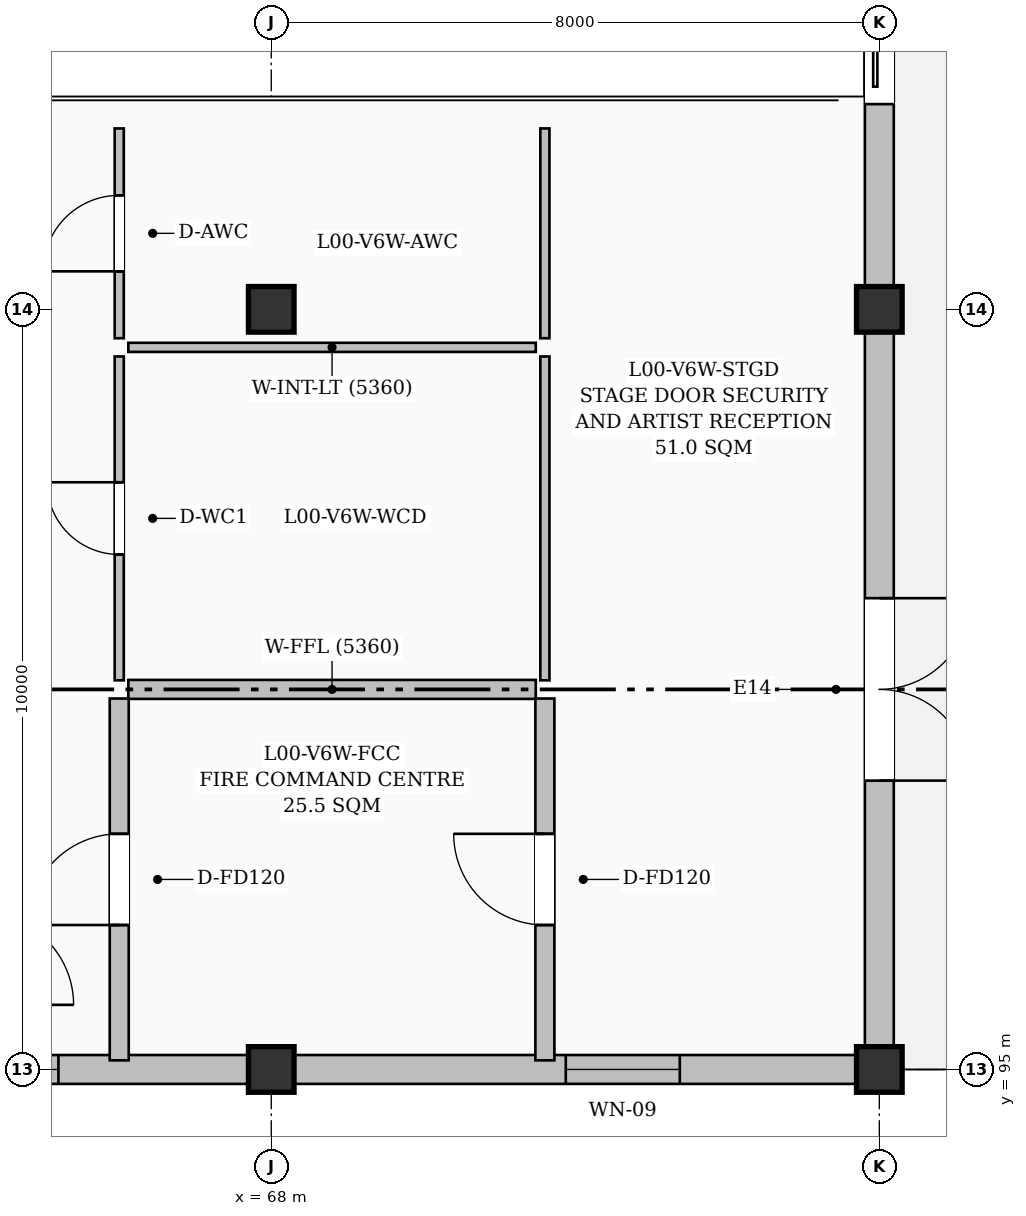
"""IFC4 building model, lengths in metres.
Left out: names, types, materials, properties, quantities, classifications, styles, units other than length and angle.
Written with IfcOpenShell. Run it as: python <this file> out.ifc"""

import sys

from ifc_helpers import new_model, si_unit, direction, frame, frame_2d, origin, origin_2d, place, context, subcontext, project, spatial, rectangle, extrude, element, fill, save


model = new_model("IFC4")
c1 = context("Model", 3, precision=1e-05, world=origin(), true_north=direction((0.0, 1.0)))
c2 = subcontext(c1, "Body", "Model", "MODEL_VIEW")
j1 = project(units=[si_unit("LENGTHUNIT", "METRE"), si_unit("PLANEANGLEUNIT", "RADIAN")], contexts=[c1])
p1 = place(None, origin())
s1 = spatial("IfcSite", under=j1, at=p1, CompositionType="ELEMENT")
p2 = place(p1, origin())
s2 = spatial("IfcBuilding", under=s1, at=p2, CompositionType="ELEMENT")
p3 = place(p2, origin())
s3 = spatial("IfcBuildingStorey", under=s2, at=p3, CompositionType="ELEMENT", Elevation=0.0)
for number, where, z_axis, x_axis in (
    (1, (68.0, 95.0, 0.0), (0.0, 0.0, 1.0), (1.0, 0.0, 0.0)),
    (2, (68.0, 105.0, 0.0), (0.0, 0.0, 1.0), (1.0, 0.0, 0.0)),
    (3, (76.0, 95.0, 0.0), (0.0, 0.0, 1.0), (1.0, 0.0, 0.0)),
    (4, (76.0, 105.0, 0.0), (0.0, 0.0, 1.0), (1.0, 0.0, 0.0)),
):
    element("IfcColumn", number, at=place(p3, frame(where, z_axis=z_axis, x_axis=x_axis)), inside=s3, PredefinedType="COLUMN", context=c2, shape_type="SweptSolid", body=[
        extrude(rectangle(XDim=0.6, YDim=0.6, at=origin_2d()), origin(), (0.0, 0.0, 1.0), 4.8),
    ])
p4 = place(p3, frame((76.0, 114.7, 0.0), z_axis=(0.0, 0.0, 1.0), x_axis=(0.0, -1.0, 0.0)))
e5 = element("IfcWall", 5, at=p4, inside=s3, PredefinedType="SOLIDWALL", context=c2, shape_type="SweptSolid", body=[
    extrude(rectangle(XDim=9.4, YDim=0.38, at=frame_2d((4.7, 0.0))), origin(), (0.0, 0.0, 1.0), 4.55),
])
p5 = place(p4, frame((2.4, 0.0, 0.0)))
e6 = element("IfcOpeningElement", 6, at=p5, cuts=e5, PredefinedType="OPENING", context=c2, shape_type="SweptSolid", body=[
    extrude(rectangle(XDim=4.6, YDim=3.0, at=frame_2d((2.3, 1.5))), frame((0.0, 0.2, 0.0), z_axis=(0.0, -1.0, 0.0), x_axis=(1.0, 0.0, 0.0)), (0.0, 0.0, 1.0), 0.4),
])
p6 = place(p3, frame((76.0, 104.7, 0.0), z_axis=(0.0, 0.0, 1.0), x_axis=(0.0, -1.0, 0.0)))
e7 = element("IfcWall", 7, at=p6, inside=s3, PredefinedType="SOLIDWALL", context=c2, shape_type="SweptSolid", body=[
    extrude(rectangle(XDim=9.4, YDim=0.38, at=frame_2d((4.7, 0.0))), origin(), (0.0, 0.0, 1.0), 4.55),
])
p7 = place(p6, frame((3.5, 0.0, 0.0)))
e8 = element("IfcOpeningElement", 8, at=p7, cuts=e7, PredefinedType="OPENING", context=c2, shape_type="SweptSolid", body=[
    extrude(rectangle(XDim=2.4, YDim=2.4, at=frame_2d((1.2, 1.2))), frame((0.0, 0.2, 0.0), z_axis=(0.0, -1.0, 0.0), x_axis=(1.0, 0.0, 0.0)), (0.0, 0.0, 1.0), 0.4),
])
p8 = place(p3, frame((75.7, 95.0, 0.0), z_axis=(0.0, 0.0, 1.0), x_axis=(-1.0, 0.0, 0.0)))
e9 = element("IfcWall", 9, at=p8, inside=s3, PredefinedType="SOLIDWALL", context=c2, shape_type="SweptSolid", body=[
    extrude(rectangle(XDim=7.4, YDim=0.38, at=frame_2d((3.7, 0.0))), origin(), (0.0, 0.0, 1.0), 4.55),
])
p9 = place(p8, frame((2.325, 0.0, 0.95)))
e10 = element("IfcOpeningElement", 10, at=p9, cuts=e9, PredefinedType="OPENING", context=c2, shape_type="SweptSolid", body=[
    extrude(rectangle(XDim=1.5, YDim=1.5, at=frame_2d((0.75, 0.75))), frame((0.0, 0.2, 0.0), z_axis=(0.0, -1.0, 0.0), x_axis=(1.0, 0.0, 0.0)), (0.0, 0.0, 1.0), 0.4),
])
p10 = place(p3, frame((67.7, 95.0, 0.0), z_axis=(0.0, 0.0, 1.0), x_axis=(-1.0, 0.0, 0.0)))
e11 = element("IfcWall", 11, at=p10, inside=s3, PredefinedType="SOLIDWALL", context=c2, shape_type="SweptSolid", body=[
    extrude(rectangle(XDim=7.4, YDim=0.38, at=frame_2d((3.7, 0.0))), origin(), (0.0, 0.0, 1.0), 4.235),
])
p11 = place(p10, frame((2.5, 0.0, 0.95)))
e12 = element("IfcOpeningElement", 12, at=p11, cuts=e11, PredefinedType="OPENING", context=c2, shape_type="SweptSolid", body=[
    extrude(rectangle(XDim=2.4, YDim=1.5, at=frame_2d((1.2, 0.75))), frame((0.0, 0.2, 0.0), z_axis=(0.0, -1.0, 0.0), x_axis=(1.0, 0.0, 0.0)), (0.0, 0.0, 1.0), 0.4),
])
p12 = place(p3, frame((66.0, 95.12, 0.0), z_axis=(0.0, 0.0, 1.0), x_axis=(0.0, 1.0, 0.0)))
e13 = element("IfcWall", 13, at=p12, inside=s3, PredefinedType="SOLIDWALL", context=c2, shape_type="SweptSolid", body=[
    extrude(rectangle(XDim=4.76, YDim=0.25, at=frame_2d((2.38, 0.0))), origin(), (0.0, 0.0, 1.0), 4.55),
])
p13 = place(p12, frame((1.78, 0.0, 0.0)))
e14 = element("IfcOpeningElement", 14, at=p13, cuts=e13, PredefinedType="OPENING", context=c2, shape_type="SweptSolid", body=[
    extrude(rectangle(XDim=1.2, YDim=2.2, at=frame_2d((0.6, 1.1))), frame((0.0, 0.135, 0.0), z_axis=(0.0, -1.0, 0.0), x_axis=(1.0, 0.0, 0.0)), (0.0, 0.0, 1.0), 0.27),
])
p14 = place(p3, frame((66.0, 100.12, 0.0), z_axis=(0.0, 0.0, 1.0), x_axis=(0.0, 1.0, 0.0)))
e15 = element("IfcWall", 15, at=p14, inside=s3, PredefinedType="PARTITIONING", context=c2, shape_type="SweptSolid", body=[
    extrude(rectangle(XDim=4.26, YDim=0.12, at=frame_2d((2.13, 0.0))), origin(), (0.0, 0.0, 1.0), 4.55),
])
p15 = place(p14, frame((1.655, 0.0, 0.0)))
e16 = element("IfcOpeningElement", 16, at=p15, cuts=e15, PredefinedType="OPENING", context=c2, shape_type="SweptSolid", body=[
    extrude(rectangle(XDim=0.95, YDim=2.1, at=frame_2d((0.475, 1.05))), frame((0.0, 0.07, 0.0), z_axis=(0.0, -1.0, 0.0), x_axis=(1.0, 0.0, 0.0)), (0.0, 0.0, 1.0), 0.14),
])
p16 = place(p3, frame((66.0, 104.62, 0.0), z_axis=(0.0, 0.0, 1.0), x_axis=(0.0, 1.0, 0.0)))
e17 = element("IfcWall", 17, at=p16, inside=s3, PredefinedType="PARTITIONING", context=c2, shape_type="SweptSolid", body=[
    extrude(rectangle(XDim=2.76, YDim=0.12, at=frame_2d((1.38, 0.0))), origin(), (0.0, 0.0, 1.0), 4.55),
])
p17 = place(p16, frame((0.88, 0.0, 0.0)))
e18 = element("IfcOpeningElement", 18, at=p17, cuts=e17, PredefinedType="OPENING", context=c2, shape_type="SweptSolid", body=[
    extrude(rectangle(XDim=1.0, YDim=2.1, at=frame_2d((0.5, 1.05))), frame((0.0, 0.07, 0.0), z_axis=(0.0, -1.0, 0.0), x_axis=(1.0, 0.0, 0.0)), (0.0, 0.0, 1.0), 0.14),
])
p18 = place(p3, frame((71.6, 95.12, 0.0), z_axis=(0.0, 0.0, 1.0), x_axis=(0.0, 1.0, 0.0)))
e19 = element("IfcWall", 19, at=p18, inside=s3, PredefinedType="SOLIDWALL", context=c2, shape_type="SweptSolid", body=[
    extrude(rectangle(XDim=4.76, YDim=0.25, at=frame_2d((2.38, 0.0))), origin(), (0.0, 0.0, 1.0), 4.55),
])
p19 = place(p18, frame((1.78, 0.0, 0.0)))
e20 = element("IfcOpeningElement", 20, at=p19, cuts=e19, PredefinedType="OPENING", context=c2, shape_type="SweptSolid", body=[
    extrude(rectangle(XDim=1.2, YDim=2.2, at=frame_2d((0.6, 1.1))), frame((0.0, 0.135, 0.0), z_axis=(0.0, -1.0, 0.0), x_axis=(1.0, 0.0, 0.0)), (0.0, 0.0, 1.0), 0.27),
])
p20 = place(p3, frame((66.12, 100.0, 0.0), z_axis=(0.0, 0.0, 1.0), x_axis=(1.0, 0.0, 0.0)))
e21 = element("IfcWall", 21, at=p20, inside=s3, PredefinedType="SOLIDWALL", context=c2, shape_type="SweptSolid", body=[
    extrude(rectangle(XDim=5.36, YDim=0.25, at=frame_2d((2.68, 0.0))), origin(), (0.0, 0.0, 1.0), 4.55),
])
p21 = place(p3, frame((71.6, 100.12, 0.0), z_axis=(0.0, 0.0, 1.0), x_axis=(0.0, 1.0, 0.0)))
e22 = element("IfcWall", 22, at=p21, inside=s3, PredefinedType="PARTITIONING", context=c2, shape_type="SweptSolid", body=[
    extrude(rectangle(XDim=4.26, YDim=0.12, at=frame_2d((2.13, 0.0))), origin(), (0.0, 0.0, 1.0), 4.55),
])
p22 = place(p3, frame((71.6, 104.62, 0.0), z_axis=(0.0, 0.0, 1.0), x_axis=(0.0, 1.0, 0.0)))
e23 = element("IfcWall", 23, at=p22, inside=s3, PredefinedType="PARTITIONING", context=c2, shape_type="SweptSolid", body=[
    extrude(rectangle(XDim=2.76, YDim=0.12, at=frame_2d((1.38, 0.0))), origin(), (0.0, 0.0, 1.0), 4.55),
])
p23 = place(p3, frame((66.12, 104.5, 0.0), z_axis=(0.0, 0.0, 1.0), x_axis=(1.0, 0.0, 0.0)))
e24 = element("IfcWall", 24, at=p23, inside=s3, PredefinedType="PARTITIONING", context=c2, shape_type="SweptSolid", body=[
    extrude(rectangle(XDim=5.36, YDim=0.12, at=frame_2d((2.68, 0.0))), origin(), (0.0, 0.0, 1.0), 4.55),
])
p24 = place(p5, origin())
e25 = element("IfcDoor", 25, at=p24, inside=s3, OperationType="ROLLINGUP", PredefinedType="DOOR", context=c2, shape_type="SweptSolid", body=[
    extrude(rectangle(XDim=4.6, YDim=3.0, at=frame_2d((2.3, 1.5))), frame((0.0, 0.025, 0.0), z_axis=(0.0, -1.0, 0.0), x_axis=(1.0, 0.0, 0.0)), (0.0, 0.0, 1.0), 0.05),
])
fill(e6, e25)
p25 = place(p7, origin())
e26 = element("IfcDoor", 26, at=p25, inside=s3, OperationType="DOUBLE_DOOR_SINGLE_SWING", PredefinedType="DOOR", context=c2, shape_type="SweptSolid", body=[
    extrude(rectangle(XDim=2.4, YDim=2.4, at=frame_2d((1.2, 1.2))), frame((0.0, 0.025, 0.0), z_axis=(0.0, -1.0, 0.0), x_axis=(1.0, 0.0, 0.0)), (0.0, 0.0, 1.0), 0.05),
])
fill(e8, e26)
p26 = place(p9, origin())
e27 = element("IfcWindow", 27, at=p26, inside=s3, PartitioningType="DOUBLE_PANEL_VERTICAL", PredefinedType="WINDOW", context=c2, shape_type="SweptSolid", body=[
    extrude(rectangle(XDim=1.5, YDim=1.5, at=frame_2d((0.75, 0.75))), frame((0.0, 0.03, 0.0), z_axis=(0.0, -1.0, 0.0), x_axis=(1.0, 0.0, 0.0)), (0.0, 0.0, 1.0), 0.06),
])
fill(e10, e27)
p27 = place(p11, origin())
e28 = element("IfcWindow", 28, at=p27, inside=s3, PartitioningType="TRIPLE_PANEL_VERTICAL", PredefinedType="WINDOW", context=c2, shape_type="SweptSolid", body=[
    extrude(rectangle(XDim=2.4, YDim=1.5, at=frame_2d((1.2, 0.75))), frame((0.0, 0.03, 0.0), z_axis=(0.0, -1.0, 0.0), x_axis=(1.0, 0.0, 0.0)), (0.0, 0.0, 1.0), 0.06),
])
fill(e12, e28)
p28 = place(p13, origin())
e29 = element("IfcDoor", 29, at=p28, inside=s3, OperationType="SINGLE_SWING_LEFT", PredefinedType="DOOR", context=c2, shape_type="SweptSolid", body=[
    extrude(rectangle(XDim=1.2, YDim=2.2, at=frame_2d((0.6, 1.1))), frame((0.0, 0.025, 0.0), z_axis=(0.0, -1.0, 0.0), x_axis=(1.0, 0.0, 0.0)), (0.0, 0.0, 1.0), 0.05),
])
fill(e14, e29)
p29 = place(p15, origin())
e30 = element("IfcDoor", 30, at=p29, inside=s3, OperationType="SINGLE_SWING_RIGHT", PredefinedType="DOOR", context=c2, shape_type="SweptSolid", body=[
    extrude(rectangle(XDim=0.95, YDim=2.1, at=frame_2d((0.475, 1.05))), frame((0.0, 0.025, 0.0), z_axis=(0.0, -1.0, 0.0), x_axis=(1.0, 0.0, 0.0)), (0.0, 0.0, 1.0), 0.05),
])
fill(e16, e30)
p30 = place(p17, origin())
e31 = element("IfcDoor", 31, at=p30, inside=s3, OperationType="SINGLE_SWING_LEFT", PredefinedType="DOOR", context=c2, shape_type="SweptSolid", body=[
    extrude(rectangle(XDim=1.0, YDim=2.1, at=frame_2d((0.5, 1.05))), frame((0.0, 0.025, 0.0), z_axis=(0.0, -1.0, 0.0), x_axis=(1.0, 0.0, 0.0)), (0.0, 0.0, 1.0), 0.05),
])
fill(e18, e31)
p31 = place(p19, origin())
e32 = element("IfcDoor", 32, at=p31, inside=s3, OperationType="SINGLE_SWING_RIGHT", PredefinedType="DOOR", context=c2, shape_type="SweptSolid", body=[
    extrude(rectangle(XDim=1.2, YDim=2.2, at=frame_2d((0.6, 1.1))), frame((0.0, 0.025, 0.0), z_axis=(0.0, -1.0, 0.0), x_axis=(1.0, 0.0, 0.0)), (0.0, 0.0, 1.0), 0.05),
])
fill(e20, e32)
save(model, sys.argv[1])
